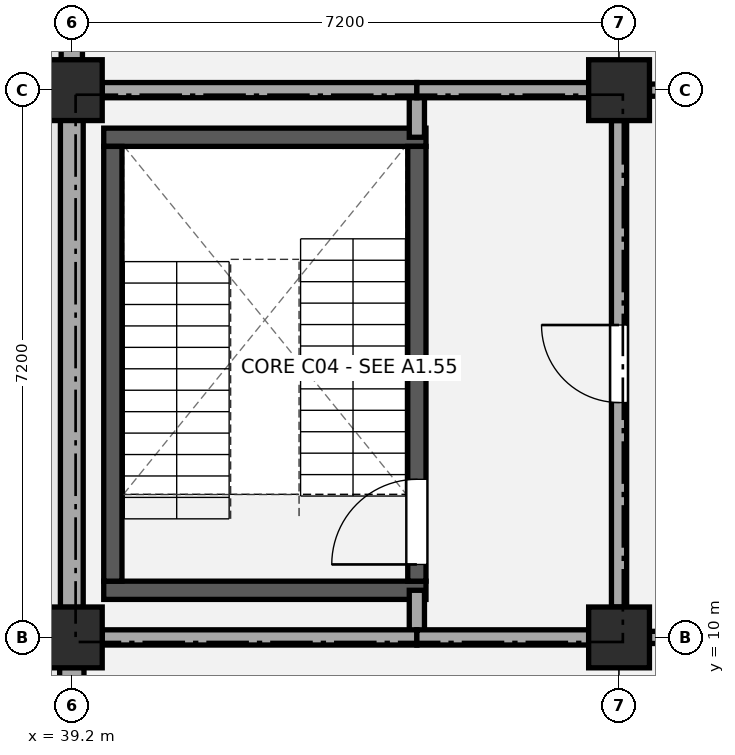
"""IFC4 building model, lengths in metres.
Left out: names, types, materials, properties, quantities, classifications, styles, units other than length and angle.
Written with IfcOpenShell. Run it as: python <this file> out.ifc"""

import sys

from ifc_helpers import new_model, si_unit, direction, frame, frame_2d, origin, origin_2d, place, context, subcontext, project, spatial, rectangle, extrude, element, fill, save


model = new_model("IFC4")
c1 = context("Model", 3, precision=1e-05, world=origin(), true_north=direction((0.0, 1.0)))
c2 = subcontext(c1, "Body", "Model", "MODEL_VIEW")
j1 = project(units=[si_unit("LENGTHUNIT", "METRE"), si_unit("PLANEANGLEUNIT", "RADIAN")], contexts=[c1])
p1 = place(None, origin())
s1 = spatial("IfcSite", under=j1, at=p1, CompositionType="ELEMENT")
p2 = place(p1, origin())
s2 = spatial("IfcBuilding", under=s1, at=p2, CompositionType="ELEMENT")
p3 = place(p2, frame((0.0, 0.0, 9.18)))
s3 = spatial("IfcBuildingStorey", under=s2, at=p3, CompositionType="ELEMENT", Elevation=9.18)
for number, where, z_axis, x_axis in (
    (1, (39.2, 10.0, 0.0), (0.0, 0.0, 1.0), (1.0, 0.0, 0.0)),
    (2, (39.2, 17.2, 0.0), (0.0, 0.0, 1.0), (1.0, 0.0, 0.0)),
    (3, (46.4, 10.0, 0.0), (0.0, 0.0, 1.0), (1.0, 0.0, 0.0)),
    (4, (46.4, 17.2, 0.0), (0.0, 0.0, 1.0), (1.0, 0.0, 0.0)),
):
    element("IfcColumn", number, at=place(p3, frame(where, z_axis=z_axis, x_axis=x_axis)), inside=s3, PredefinedType="COLUMN", context=c2, shape_type="SweptSolid", body=[
        extrude(rectangle(XDim=0.8, YDim=0.8, at=origin_2d()), origin(), (0.0, 0.0, 1.0), 4.32),
    ])
p4 = place(p3, frame((39.2, 3.195, 0.0), z_axis=(0.0, 0.0, 1.0), x_axis=(0.0, 1.0, 0.0)))
e5 = element("IfcWall", 5, at=p4, inside=s3, PredefinedType="STANDARD", context=c2, shape_type="SweptSolid", body=[
    extrude(rectangle(XDim=6.41, YDim=0.32, at=frame_2d((3.205, 0.0))), origin(), (0.0, 0.0, 1.0), 3.48),
])
p5 = place(p3, frame((39.2, 10.395, 0.0), z_axis=(0.0, 0.0, 1.0), x_axis=(0.0, 1.0, 0.0)))
e6 = element("IfcWall", 6, at=p5, inside=s3, PredefinedType="STANDARD", context=c2, shape_type="SweptSolid", body=[
    extrude(rectangle(XDim=6.41, YDim=0.3, at=frame_2d((3.205, 0.0))), origin(), (0.0, 0.0, 1.0), 3.46),
])
p6 = place(p3, frame((39.2, 17.595, 0.0), z_axis=(0.0, 0.0, 1.0), x_axis=(0.0, 1.0, 0.0)))
e7 = element("IfcWall", 7, at=p6, inside=s3, PredefinedType="STANDARD", context=c2, shape_type="SweptSolid", body=[
    extrude(rectangle(XDim=6.41, YDim=0.28, at=frame_2d((3.205, 0.0))), origin(), (0.0, 0.0, 1.0), 3.48),
])
for number, where, z_axis, x_axis in (
    (8, (39.62, 10.62, 0.0), (0.0, 0.0, 1.0), (1.0, 0.0, 0.0)),
    (9, (39.62, 16.58, 0.0), (0.0, 0.0, 1.0), (1.0, 0.0, 0.0)),
):
    element("IfcWall", number, at=place(p3, frame(where, z_axis=z_axis, x_axis=x_axis)), inside=s3, PredefinedType="SHEAR", context=c2, shape_type="SweptSolid", body=[
        extrude(rectangle(XDim=4.24, YDim=0.24, at=frame_2d((2.12, 0.0))), origin(), (0.0, 0.0, 1.0), 4.02),
    ])
p7 = place(p3, frame((39.74, 10.74, 0.0), z_axis=(0.0, 0.0, 1.0), x_axis=(0.0, 1.0, 0.0)))
e10 = element("IfcWall", 10, at=p7, inside=s3, PredefinedType="SHEAR", context=c2, shape_type="SweptSolid", body=[
    extrude(rectangle(XDim=5.72, YDim=0.24, at=frame_2d((2.86, 0.0))), origin(), (0.0, 0.0, 1.0), 4.02),
])
p8 = place(p3, frame((43.74, 10.74, 0.0), z_axis=(0.0, 0.0, 1.0), x_axis=(0.0, 1.0, 0.0)))
e11 = element("IfcWall", 11, at=p8, inside=s3, PredefinedType="SHEAR", context=c2, shape_type="SweptSolid", body=[
    extrude(rectangle(XDim=5.72, YDim=0.24, at=frame_2d((2.86, 0.0))), origin(), (0.0, 0.0, 1.0), 4.02),
])
p9 = place(p8, frame((0.22, 0.0, 0.0)))
e12 = element("IfcOpeningElement", 12, at=p9, cuts=e11, PredefinedType="OPENING", context=c2, shape_type="SweptSolid", body=[
    extrude(rectangle(XDim=1.12, YDim=2.15, at=frame_2d((0.56, 1.075))), frame((0.0, 0.13, 0.0), z_axis=(0.0, -1.0, 0.0), x_axis=(1.0, 0.0, 0.0)), (0.0, 0.0, 1.0), 0.26),
])
p10 = place(p3, frame((43.74, 10.0, 0.0), z_axis=(0.0, 0.0, 1.0), x_axis=(0.0, 1.0, 0.0)))
e13 = element("IfcWall", 13, at=p10, inside=s3, PredefinedType="PARTITIONING", context=c2, shape_type="SweptSolid", body=[
    extrude(rectangle(XDim=0.62, YDim=0.2, at=frame_2d((0.31, 0.0))), origin(), (0.0, 0.0, 1.0), 3.36),
])
p11 = place(p3, frame((43.74, 16.58, 0.0), z_axis=(0.0, 0.0, 1.0), x_axis=(0.0, 1.0, 0.0)))
e14 = element("IfcWall", 14, at=p11, inside=s3, PredefinedType="PARTITIONING", context=c2, shape_type="SweptSolid", body=[
    extrude(rectangle(XDim=0.62, YDim=0.2, at=frame_2d((0.31, 0.0))), origin(), (0.0, 0.0, 1.0), 3.41),
])
p12 = place(p3, frame((46.4, 10.4, 0.0), z_axis=(0.0, 0.0, 1.0), x_axis=(0.0, 1.0, 0.0)))
e15 = element("IfcWall", 15, at=p12, inside=s3, PredefinedType="PARTITIONING", context=c2, shape_type="SweptSolid", body=[
    extrude(rectangle(XDim=6.4, YDim=0.2, at=frame_2d((3.2, 0.0))), origin(), (0.0, 0.0, 1.0), 3.41),
])
p13 = place(p12, frame((2.69, 0.0, 0.0)))
e16 = element("IfcOpeningElement", 16, at=p13, cuts=e15, PredefinedType="OPENING", context=c2, shape_type="SweptSolid", body=[
    extrude(rectangle(XDim=1.02, YDim=2.15, at=frame_2d((0.51, 1.075))), frame((0.0, 0.11, 0.0), z_axis=(0.0, -1.0, 0.0), x_axis=(1.0, 0.0, 0.0)), (0.0, 0.0, 1.0), 0.22),
])
p14 = place(p3, frame((39.6, 10.0, 0.0), z_axis=(0.0, 0.0, 1.0), x_axis=(1.0, 0.0, 0.0)))
e17 = element("IfcWall", 17, at=p14, inside=s3, PredefinedType="PARTITIONING", context=c2, shape_type="SweptSolid", body=[
    extrude(rectangle(XDim=4.14, YDim=0.2, at=frame_2d((2.07, 0.0))), origin(), (0.0, 0.0, 1.0), 3.36),
])
p15 = place(p3, frame((43.74, 10.0, 0.0), z_axis=(0.0, 0.0, 1.0), x_axis=(1.0, 0.0, 0.0)))
e18 = element("IfcWall", 18, at=p15, inside=s3, PredefinedType="PARTITIONING", context=c2, shape_type="SweptSolid", body=[
    extrude(rectangle(XDim=2.26, YDim=0.2, at=frame_2d((1.13, 0.0))), origin(), (0.0, 0.0, 1.0), 3.36),
])
p16 = place(p3, frame((39.6, 17.2, 0.0), z_axis=(0.0, 0.0, 1.0), x_axis=(1.0, 0.0, 0.0)))
e19 = element("IfcWall", 19, at=p16, inside=s3, PredefinedType="PARTITIONING", context=c2, shape_type="SweptSolid", body=[
    extrude(rectangle(XDim=4.14, YDim=0.2, at=frame_2d((2.07, 0.0))), origin(), (0.0, 0.0, 1.0), 3.41),
])
p17 = place(p3, frame((43.74, 17.2, 0.0), z_axis=(0.0, 0.0, 1.0), x_axis=(1.0, 0.0, 0.0)))
e20 = element("IfcWall", 20, at=p17, inside=s3, PredefinedType="PARTITIONING", context=c2, shape_type="SweptSolid", body=[
    extrude(rectangle(XDim=2.26, YDim=0.2, at=frame_2d((1.13, 0.0))), origin(), (0.0, 0.0, 1.0), 3.41),
])
p18 = place(p3, frame((46.8, 10.0, 0.0), z_axis=(0.0, 0.0, 1.0), x_axis=(1.0, 0.0, 0.0)))
e21 = element("IfcWall", 21, at=p18, inside=s3, PredefinedType="PARTITIONING", context=c2, shape_type="SweptSolid", body=[
    extrude(rectangle(XDim=6.4, YDim=0.16, at=frame_2d((3.2, 0.0))), origin(), (0.0, 0.0, 1.0), 3.41),
])
p19 = place(p18, frame((2.17, 0.0, 0.0)))
e22 = element("IfcOpeningElement", 22, at=p19, cuts=e21, PredefinedType="OPENING", context=c2, shape_type="SweptSolid", body=[
    extrude(rectangle(XDim=2.06, YDim=2.28, at=frame_2d((1.03, 1.14))), frame((0.0, 0.09, 0.0), z_axis=(0.0, -1.0, 0.0), x_axis=(1.0, 0.0, 0.0)), (0.0, 0.0, 1.0), 0.18),
])
p20 = place(p3, frame((46.8, 17.2, 0.0), z_axis=(0.0, 0.0, 1.0), x_axis=(1.0, 0.0, 0.0)))
e23 = element("IfcWall", 23, at=p20, inside=s3, PredefinedType="PARTITIONING", context=c2, shape_type="SweptSolid", body=[
    extrude(rectangle(XDim=6.4, YDim=0.16, at=frame_2d((3.2, 0.0))), origin(), (0.0, 0.0, 1.0), 3.38),
])
p21 = place(p20, frame((2.66, 0.0, 0.0)))
e24 = element("IfcOpeningElement", 24, at=p21, cuts=e23, PredefinedType="OPENING", context=c2, shape_type="SweptSolid", body=[
    extrude(rectangle(XDim=1.08, YDim=2.16, at=frame_2d((0.54, 1.08))), frame((0.0, 0.09, 0.0), z_axis=(0.0, -1.0, 0.0), x_axis=(1.0, 0.0, 0.0)), (0.0, 0.0, 1.0), 0.18),
])
p22 = place(p9, origin())
e25 = element("IfcDoor", 25, at=p22, inside=s3, OperationType="SINGLE_SWING_LEFT", PredefinedType="DOOR", context=c2, shape_type="SweptSolid", body=[
    extrude(rectangle(XDim=1.12, YDim=2.15, at=frame_2d((0.56, 1.075))), frame((0.0, 0.025, 0.0), z_axis=(0.0, -1.0, 0.0), x_axis=(1.0, 0.0, 0.0)), (0.0, 0.0, 1.0), 0.05),
])
fill(e12, e25)
p23 = place(p13, origin())
e26 = element("IfcDoor", 26, at=p23, inside=s3, OperationType="SINGLE_SWING_RIGHT", PredefinedType="DOOR", context=c2, shape_type="SweptSolid", body=[
    extrude(rectangle(XDim=1.02, YDim=2.15, at=frame_2d((0.51, 1.075))), frame((0.0, 0.025, 0.0), z_axis=(0.0, -1.0, 0.0), x_axis=(1.0, 0.0, 0.0)), (0.0, 0.0, 1.0), 0.05),
])
fill(e16, e26)
save(model, sys.argv[1])
